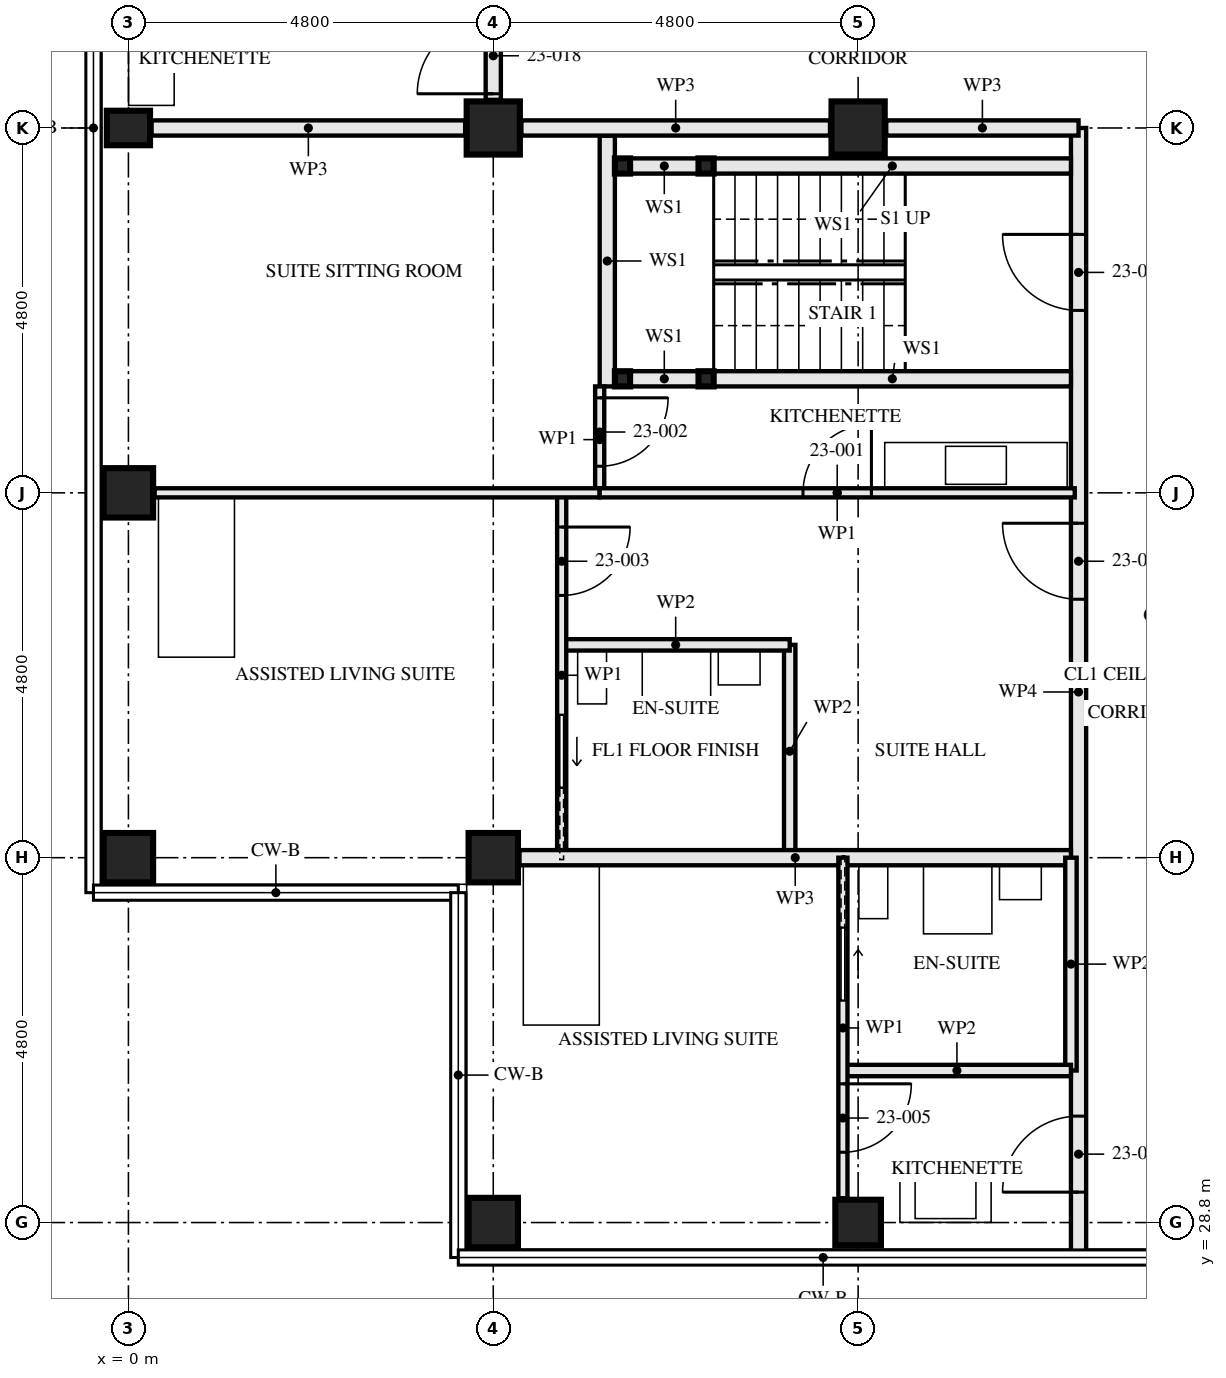
"""IFC4 building model, lengths in metres.
Left out: names, types, materials, properties, quantities, classifications, styles, units other than length and angle.
Written with IfcOpenShell. Run it as: python <this file> out.ifc"""

import sys

from ifc_helpers import new_model, si_unit, direction, frame, frame_2d, origin, origin_2d, place, context, subcontext, project, spatial, rectangle, hollow_rectangle, i_section, extrude, element, fill, save


model = new_model("IFC4")
c1 = context("Model", 3, precision=1e-05, world=origin(), true_north=direction((0.0, 1.0)))
c2 = subcontext(c1, "Body", "Model", "MODEL_VIEW")
j1 = project(units=[si_unit("LENGTHUNIT", "METRE"), si_unit("PLANEANGLEUNIT", "RADIAN")], contexts=[c1])
p1 = place(None, origin())
s1 = spatial("IfcSite", under=j1, at=p1, CompositionType="ELEMENT")
p2 = place(p1, origin())
s2 = spatial("IfcBuilding", under=s1, at=p2, CompositionType="ELEMENT")
p3 = place(p2, frame((0.0, 0.0, 87.5)))
s3 = spatial("IfcBuildingStorey", under=s2, at=p3, CompositionType="ELEMENT", Elevation=87.5)
for number, where, z_axis, x_axis in (
    (1, (0.0, 33.6, 0.0), (0.0, 0.0, 1.0), (0.0, 1.0, 0.0)),
    (2, (0.0, 38.4, 0.0), (0.0, 0.0, 1.0), (1.0, 0.0, 0.0)),
):
    element("IfcColumn", number, at=place(p3, frame(where, z_axis=z_axis, x_axis=x_axis)), inside=s3, PredefinedType="COLUMN", context=c2, shape_type="SweptSolid", body=[
        extrude(hollow_rectangle(XDim=0.65, YDim=0.65, WallThickness=0.08, at=origin_2d()), origin(), (0.0, 0.0, 1.0), 3.5),
    ])
p4 = place(p3, frame((0.0, 43.2, 0.0), z_axis=(0.0, 0.0, 1.0), x_axis=(0.0, 1.0, 0.0)))
e3 = element("IfcColumn", 3, at=p4, inside=s3, PredefinedType="COLUMN", context=c2, shape_type="SweptSolid", body=[
    extrude(i_section(OverallWidth=0.454, OverallDepth=0.569, WebThickness=0.078, FlangeThickness=0.125, FilletRadius=0.015, at=origin_2d()), origin(), (0.0, 0.0, 1.0), 3.5),
])
for number, where, z_axis, x_axis in (
    (4, (4.8, 28.8, 0.0), (0.0, 0.0, 1.0), (0.0, 1.0, 0.0)),
    (5, (4.8, 33.6, 0.0), (0.0, 0.0, 1.0), (0.0, 1.0, 0.0)),
):
    element("IfcColumn", number, at=place(p3, frame(where, z_axis=z_axis, x_axis=x_axis)), inside=s3, PredefinedType="COLUMN", context=c2, shape_type="SweptSolid", body=[
        extrude(hollow_rectangle(XDim=0.65, YDim=0.65, WallThickness=0.08, at=origin_2d()), origin(), (0.0, 0.0, 1.0), 3.5),
    ])
p5 = place(p3, frame((4.8, 43.2, 0.0), z_axis=(0.0, 0.0, 1.0), x_axis=(0.0, 1.0, 0.0)))
e6 = element("IfcColumn", 6, at=p5, inside=s3, PredefinedType="COLUMN", context=c2, shape_type="SweptSolid", body=[
    extrude(hollow_rectangle(XDim=0.7, YDim=0.7, WallThickness=0.06, at=origin_2d()), origin(), (0.0, 0.0, 1.0), 3.5),
])
p6 = place(p3, frame((9.6, 28.8, 0.0), z_axis=(0.0, 0.0, 1.0), x_axis=(0.0, 1.0, 0.0)))
e7 = element("IfcColumn", 7, at=p6, inside=s3, PredefinedType="COLUMN", context=c2, shape_type="SweptSolid", body=[
    extrude(hollow_rectangle(XDim=0.6, YDim=0.6, WallThickness=0.08, at=origin_2d()), origin(), (0.0, 0.0, 1.0), 3.5),
])
p7 = place(p3, frame((9.6, 43.2, 0.0), z_axis=(0.0, 0.0, 1.0), x_axis=(0.0, 1.0, 0.0)))
e8 = element("IfcColumn", 8, at=p7, inside=s3, PredefinedType="COLUMN", context=c2, shape_type="SweptSolid", body=[
    extrude(hollow_rectangle(XDim=0.7, YDim=0.7, WallThickness=0.06, at=origin_2d()), origin(), (0.0, 0.0, 1.0), 3.5),
])
for number, where, z_axis, x_axis in (
    (9, (6.5, 42.7, 0.0), (0.0, 0.0, 1.0), (1.0, 0.0, 0.0)),
    (10, (6.5, 39.9, 0.0), (0.0, 0.0, 1.0), (1.0, 0.0, 0.0)),
    (11, (7.6, 42.7, 0.0), (0.0, 0.0, 1.0), (1.0, 0.0, 0.0)),
    (12, (7.6, 39.9, 0.0), (0.0, 0.0, 1.0), (1.0, 0.0, 0.0)),
):
    element("IfcColumn", number, at=place(p3, frame(where, z_axis=z_axis, x_axis=x_axis)), inside=s3, PredefinedType="COLUMN", context=c2, shape_type="SweptSolid", body=[
        extrude(hollow_rectangle(XDim=0.2, YDim=0.2, WallThickness=0.008, at=origin_2d()), origin(), (0.0, 0.0, 1.0), 3.33),
    ])
p8 = place(p3, frame((6.6, 42.7, 0.0), z_axis=(0.0, 0.0, 1.0), x_axis=(1.0, 0.0, 0.0)))
e13 = element("IfcWall", 13, at=p8, inside=s3, PredefinedType="SOLIDWALL", context=c2, shape_type="SweptSolid", body=[
    extrude(rectangle(XDim=0.9, YDim=0.2, at=frame_2d((0.45, 0.0))), origin(), (0.0, 0.0, 1.0), 2.99),
])
p9 = place(p3, frame((7.7, 42.7, 0.0), z_axis=(0.0, 0.0, 1.0), x_axis=(1.0, 0.0, 0.0)))
e14 = element("IfcWall", 14, at=p9, inside=s3, PredefinedType="SOLIDWALL", context=c2, shape_type="SweptSolid", body=[
    extrude(rectangle(XDim=4.7, YDim=0.2, at=frame_2d((2.35, 0.0))), origin(), (0.0, 0.0, 1.0), 2.99),
])
p10 = place(p3, frame((6.6, 39.9, 0.0), z_axis=(0.0, 0.0, 1.0), x_axis=(1.0, 0.0, 0.0)))
e15 = element("IfcWall", 15, at=p10, inside=s3, PredefinedType="SOLIDWALL", context=c2, shape_type="SweptSolid", body=[
    extrude(rectangle(XDim=0.9, YDim=0.2, at=frame_2d((0.45, 0.0))), origin(), (0.0, 0.0, 1.0), 2.99),
])
p11 = place(p3, frame((7.7, 39.9, 0.0), z_axis=(0.0, 0.0, 1.0), x_axis=(1.0, 0.0, 0.0)))
e16 = element("IfcWall", 16, at=p11, inside=s3, PredefinedType="SOLIDWALL", context=c2, shape_type="SweptSolid", body=[
    extrude(rectangle(XDim=4.7, YDim=0.2, at=frame_2d((2.35, 0.0))), origin(), (0.0, 0.0, 1.0), 2.99),
])
p12 = place(p3, frame((6.3, 43.1, 0.0), z_axis=(0.0, 0.0, 1.0), x_axis=(0.0, -1.0, 0.0)))
e17 = element("IfcWall", 17, at=p12, inside=s3, PredefinedType="SOLIDWALL", context=c2, shape_type="SweptSolid", body=[
    extrude(rectangle(XDim=3.3, YDim=0.2, at=frame_2d((1.65, 0.0))), origin(), (0.0, 0.0, 1.0), 3.33),
])
p13 = place(p3, frame((5.7, 36.4, 0.0), z_axis=(0.0, 0.0, 1.0), x_axis=(1.0, 0.0, 0.0)))
e18 = element("IfcWall", 18, at=p13, inside=s3, PredefinedType="PARTITIONING", context=c2, shape_type="SweptSolid", body=[
    extrude(rectangle(XDim=3.0, YDim=0.15, at=frame_2d((1.5, 0.0))), origin(), (0.0, 0.0, 1.0), 3.33),
])
p14 = place(p3, frame((8.7, 36.4, 0.0), z_axis=(0.0, 0.0, 1.0), x_axis=(0.0, -1.0, 0.0)))
e19 = element("IfcWall", 19, at=p14, inside=s3, PredefinedType="PARTITIONING", context=c2, shape_type="SweptSolid", body=[
    extrude(rectangle(XDim=2.8, YDim=0.15, at=frame_2d((1.4, 0.0))), origin(), (0.0, 0.0, 1.0), 3.33),
])
p15 = place(p3, frame((6.2, 38.4, 0.0), z_axis=(0.0, 0.0, 1.0), x_axis=(1.0, 0.0, 0.0)))
e20 = element("IfcWall", 20, at=p15, inside=s3, PredefinedType="PARTITIONING", context=c2, shape_type="SweptSolid", body=[
    extrude(rectangle(XDim=6.25, YDim=0.12, at=frame_2d((3.125, 0.0))), origin(), (0.0, 0.0, 1.0), 2.55),
])
p16 = place(p15, frame((2.675, 0.0, 0.0)))
e21 = element("IfcOpeningElement", 21, at=p16, cuts=e20, PredefinedType="OPENING", context=c2, shape_type="SweptSolid", body=[
    extrude(rectangle(XDim=0.9, YDim=2.1, at=frame_2d((0.45, 1.05))), frame((0.0, 0.071, 0.0), z_axis=(0.0, -1.0, 0.0), x_axis=(1.0, 0.0, 0.0)), (0.0, 0.0, 1.0), 0.141),
])
p17 = place(p3, frame((6.2, 39.8, 0.0), z_axis=(0.0, 0.0, 1.0), x_axis=(0.0, -1.0, 0.0)))
e22 = element("IfcWall", 22, at=p17, inside=s3, PredefinedType="PARTITIONING", context=c2, shape_type="SweptSolid", body=[
    extrude(rectangle(XDim=1.4, YDim=0.12, at=frame_2d((0.7, 0.0))), origin(), (0.0, 0.0, 1.0), 3.33),
])
p18 = place(p17, frame((0.15, 0.0, 0.0)))
e23 = element("IfcOpeningElement", 23, at=p18, cuts=e22, PredefinedType="OPENING", context=c2, shape_type="SweptSolid", body=[
    extrude(rectangle(XDim=0.9, YDim=2.1, at=frame_2d((0.45, 1.05))), frame((0.0, 0.071, 0.0), z_axis=(0.0, -1.0, 0.0), x_axis=(1.0, 0.0, 0.0)), (0.0, 0.0, 1.0), 0.141),
])
p19 = place(p3, frame((5.7, 38.4, 0.0), z_axis=(0.0, 0.0, 1.0), x_axis=(0.0, -1.0, 0.0)))
e24 = element("IfcWall", 24, at=p19, inside=s3, PredefinedType="PARTITIONING", context=c2, shape_type="SweptSolid", body=[
    extrude(rectangle(XDim=4.8, YDim=0.12, at=frame_2d((2.4, 0.0))), origin(), (0.0, 0.0, 1.0), 3.33),
])
p20 = place(p19, frame((0.45, 0.0, 0.0)))
e25 = element("IfcOpeningElement", 25, at=p20, cuts=e24, PredefinedType="OPENING", context=c2, shape_type="SweptSolid", body=[
    extrude(rectangle(XDim=0.9, YDim=2.1, at=frame_2d((0.45, 1.05))), frame((0.0, 0.071, 0.0), z_axis=(0.0, -1.0, 0.0), x_axis=(1.0, 0.0, 0.0)), (0.0, 0.0, 1.0), 0.141),
])
p21 = place(p19, frame((2.925, 0.0, 0.0)))
e26 = element("IfcOpeningElement", 26, at=p21, cuts=e24, PredefinedType="OPENING", context=c2, shape_type="SweptSolid", body=[
    extrude(rectangle(XDim=0.95, YDim=2.1, at=frame_2d((0.475, 1.05))), frame((0.0, 0.071, 0.0), z_axis=(0.0, -1.0, 0.0), x_axis=(1.0, 0.0, 0.0)), (0.0, 0.0, 1.0), 0.141),
])
p22 = place(p3, frame((0.345, 38.4, 0.0), z_axis=(0.0, 0.0, 1.0), x_axis=(1.0, 0.0, 0.0)))
e27 = element("IfcWall", 27, at=p22, inside=s3, PredefinedType="PARTITIONING", context=c2, shape_type="SweptSolid", body=[
    extrude(rectangle(XDim=5.855, YDim=0.12, at=frame_2d((2.927, 0.0))), origin(), (0.0, 0.0, 1.0), 2.55),
])
p23 = place(p3, frame((5.145, 33.6, 0.0), z_axis=(0.0, 0.0, 1.0), x_axis=(1.0, 0.0, 0.0)))
e28 = element("IfcWall", 28, at=p23, inside=s3, PredefinedType="PARTITIONING", context=c2, shape_type="SweptSolid", body=[
    extrude(rectangle(XDim=7.255, YDim=0.2, at=frame_2d((3.627, 0.0))), origin(), (0.0, 0.0, 1.0), 2.55),
])
p24 = place(p3, frame((9.4, 30.8, 0.0), z_axis=(0.0, 0.0, 1.0), x_axis=(1.0, 0.0, 0.0)))
e29 = element("IfcWall", 29, at=p24, inside=s3, PredefinedType="PARTITIONING", context=c2, shape_type="SweptSolid", body=[
    extrude(rectangle(XDim=3.0, YDim=0.15, at=frame_2d((1.5, 0.0))), origin(), (0.0, 0.0, 1.0), 3.33),
])
p25 = place(p3, frame((12.4, 33.6, 0.0), z_axis=(0.0, 0.0, 1.0), x_axis=(0.0, -1.0, 0.0)))
e30 = element("IfcWall", 30, at=p25, inside=s3, PredefinedType="PARTITIONING", context=c2, shape_type="SweptSolid", body=[
    extrude(rectangle(XDim=2.8, YDim=0.15, at=frame_2d((1.4, 0.0))), origin(), (0.0, 0.0, 1.0), 3.33),
])
p26 = place(p3, frame((9.4, 33.6, 0.0), z_axis=(0.0, 0.0, 1.0), x_axis=(0.0, -1.0, 0.0)))
e31 = element("IfcWall", 31, at=p26, inside=s3, PredefinedType="PARTITIONING", context=c2, shape_type="SweptSolid", body=[
    extrude(rectangle(XDim=4.48, YDim=0.12, at=frame_2d((2.24, 0.0))), origin(), (0.0, 0.0, 1.0), 3.33),
])
p27 = place(p26, frame((2.975, 0.0, 0.0)))
e32 = element("IfcOpeningElement", 32, at=p27, cuts=e31, PredefinedType="OPENING", context=c2, shape_type="SweptSolid", body=[
    extrude(rectangle(XDim=0.9, YDim=2.1, at=frame_2d((0.45, 1.05))), frame((0.0, 0.071, 0.0), z_axis=(0.0, -1.0, 0.0), x_axis=(1.0, 0.0, 0.0)), (0.0, 0.0, 1.0), 0.141),
])
p28 = place(p26, frame((0.925, 0.0, 0.0)))
e33 = element("IfcOpeningElement", 33, at=p28, cuts=e31, PredefinedType="OPENING", context=c2, shape_type="SweptSolid", body=[
    extrude(rectangle(XDim=0.95, YDim=2.1, at=frame_2d((0.475, 1.05))), frame((0.0, 0.071, 0.0), z_axis=(0.0, -1.0, 0.0), x_axis=(1.0, 0.0, 0.0)), (0.0, 0.0, 1.0), 0.141),
])
p29 = place(p3, frame((12.5, 43.2, 0.0), z_axis=(0.0, 0.0, 1.0), x_axis=(0.0, -1.0, 0.0)))
e34 = element("IfcWall", 34, at=p29, inside=s3, PredefinedType="PARTITIONING", context=c2, shape_type="SweptSolid", body=[
    extrude(rectangle(XDim=14.84, YDim=0.2, at=frame_2d((7.42, 0.0))), origin(), (0.0, 0.0, 1.0), 2.32),
])
p30 = place(p29, frame((1.4, 0.0, 0.0)))
e35 = element("IfcOpeningElement", 35, at=p30, cuts=e34, PredefinedType="OPENING", context=c2, shape_type="SweptSolid", body=[
    extrude(rectangle(XDim=1.0, YDim=2.1, at=frame_2d((0.5, 1.05))), frame((0.0, 0.111, 0.0), z_axis=(0.0, -1.0, 0.0), x_axis=(1.0, 0.0, 0.0)), (0.0, 0.0, 1.0), 0.221),
])
p31 = place(p29, frame((5.2, 0.0, 0.0)))
e36 = element("IfcOpeningElement", 36, at=p31, cuts=e34, PredefinedType="OPENING", context=c2, shape_type="SweptSolid", body=[
    extrude(rectangle(XDim=1.0, YDim=2.1, at=frame_2d((0.5, 1.05))), frame((0.0, 0.111, 0.0), z_axis=(0.0, -1.0, 0.0), x_axis=(1.0, 0.0, 0.0)), (0.0, 0.0, 1.0), 0.221),
])
p32 = place(p29, frame((13.0, 0.0, 0.0)))
e37 = element("IfcOpeningElement", 37, at=p32, cuts=e34, PredefinedType="OPENING", context=c2, shape_type="SweptSolid", body=[
    extrude(rectangle(XDim=1.0, YDim=2.1, at=frame_2d((0.5, 1.05))), frame((0.0, 0.111, 0.0), z_axis=(0.0, -1.0, 0.0), x_axis=(1.0, 0.0, 0.0)), (0.0, 0.0, 1.0), 0.221),
])
p33 = place(p3, frame((4.8, 45.2, 0.0), z_axis=(0.0, 0.0, 1.0), x_axis=(0.0, -1.0, 0.0)))
e38 = element("IfcWall", 38, at=p33, inside=s3, PredefinedType="PARTITIONING", context=c2, shape_type="SweptSolid", body=[
    extrude(rectangle(XDim=1.63, YDim=0.2, at=frame_2d((0.815, 0.0))), origin(), (0.0, 0.0, 1.0), 3.33),
])
p34 = place(p33, frame((0.55, 0.0, 0.0)))
e39 = element("IfcOpeningElement", 39, at=p34, cuts=e38, PredefinedType="OPENING", context=c2, shape_type="SweptSolid", body=[
    extrude(rectangle(XDim=1.0, YDim=2.1, at=frame_2d((0.5, 1.05))), frame((0.0, 0.111, 0.0), z_axis=(0.0, -1.0, 0.0), x_axis=(1.0, 0.0, 0.0)), (0.0, 0.0, 1.0), 0.221),
])
p35 = place(p3, frame((12.5, 43.2, 0.0), z_axis=(0.0, 0.0, 1.0), x_axis=(-1.0, 0.0, 0.0)))
e40 = element("IfcWall", 40, at=p35, inside=s3, PredefinedType="PARTITIONING", context=c2, shape_type="SweptSolid", body=[
    extrude(rectangle(XDim=2.53, YDim=0.2, at=frame_2d((1.265, 0.0))), origin(), (0.0, 0.0, 1.0), 2.32),
])
p36 = place(p3, frame((9.23, 43.2, 0.0), z_axis=(0.0, 0.0, 1.0), x_axis=(-1.0, 0.0, 0.0)))
e41 = element("IfcWall", 41, at=p36, inside=s3, PredefinedType="PARTITIONING", context=c2, shape_type="SweptSolid", body=[
    extrude(rectangle(XDim=4.06, YDim=0.2, at=frame_2d((2.03, 0.0))), origin(), (0.0, 0.0, 1.0), 2.32),
])
p37 = place(p3, frame((4.43, 43.2, 0.0), z_axis=(0.0, 0.0, 1.0), x_axis=(-1.0, 0.0, 0.0)))
e42 = element("IfcWall", 42, at=p37, inside=s3, PredefinedType="PARTITIONING", context=c2, shape_type="SweptSolid", body=[
    extrude(rectangle(XDim=4.125, YDim=0.2, at=frame_2d((2.063, 0.0))), origin(), (0.0, 0.0, 1.0), 2.32),
])
p38 = place(p16, origin())
e43 = element("IfcDoor", 43, at=p38, inside=s3, OperationType="SINGLE_SWING_LEFT", PredefinedType="DOOR", context=c2, shape_type="SweptSolid", body=[
    extrude(rectangle(XDim=0.9, YDim=2.1, at=frame_2d((0.45, 1.05))), frame((0.0, 0.022, 0.0), z_axis=(0.0, -1.0, 0.0), x_axis=(1.0, 0.0, 0.0)), (0.0, 0.0, 1.0), 0.044),
])
fill(e21, e43)
p39 = place(p18, origin())
e44 = element("IfcDoor", 44, at=p39, inside=s3, OperationType="SINGLE_SWING_RIGHT", PredefinedType="DOOR", context=c2, shape_type="SweptSolid", body=[
    extrude(rectangle(XDim=0.9, YDim=2.1, at=frame_2d((0.45, 1.05))), frame((0.0, 0.022, 0.0), z_axis=(0.0, -1.0, 0.0), x_axis=(1.0, 0.0, 0.0)), (0.0, 0.0, 1.0), 0.044),
])
fill(e23, e44)
p40 = place(p20, origin())
e45 = element("IfcDoor", 45, at=p40, inside=s3, OperationType="SINGLE_SWING_RIGHT", PredefinedType="DOOR", context=c2, shape_type="SweptSolid", body=[
    extrude(rectangle(XDim=0.9, YDim=2.1, at=frame_2d((0.45, 1.05))), frame((0.0, 0.022, 0.0), z_axis=(0.0, -1.0, 0.0), x_axis=(1.0, 0.0, 0.0)), (0.0, 0.0, 1.0), 0.044),
])
fill(e25, e45)
p41 = place(p21, origin())
e46 = element("IfcDoor", 46, at=p41, inside=s3, OperationType="SLIDING_TO_LEFT", PredefinedType="DOOR", context=c2, shape_type="SweptSolid", body=[
    extrude(rectangle(XDim=0.95, YDim=2.1, at=frame_2d((0.475, 1.05))), frame((0.0, 0.022, 0.0), z_axis=(0.0, -1.0, 0.0), x_axis=(1.0, 0.0, 0.0)), (0.0, 0.0, 1.0), 0.044),
])
fill(e26, e46)
p42 = place(p27, origin())
e47 = element("IfcDoor", 47, at=p42, inside=s3, OperationType="SINGLE_SWING_RIGHT", PredefinedType="DOOR", context=c2, shape_type="SweptSolid", body=[
    extrude(rectangle(XDim=0.9, YDim=2.1, at=frame_2d((0.45, 1.05))), frame((0.0, 0.022, 0.0), z_axis=(0.0, -1.0, 0.0), x_axis=(1.0, 0.0, 0.0)), (0.0, 0.0, 1.0), 0.044),
])
fill(e32, e47)
p43 = place(p28, origin())
e48 = element("IfcDoor", 48, at=p43, inside=s3, OperationType="SLIDING_TO_RIGHT", PredefinedType="DOOR", context=c2, shape_type="SweptSolid", body=[
    extrude(rectangle(XDim=0.95, YDim=2.1, at=frame_2d((0.475, 1.05))), frame((0.0, 0.022, 0.0), z_axis=(0.0, -1.0, 0.0), x_axis=(1.0, 0.0, 0.0)), (0.0, 0.0, 1.0), 0.044),
])
fill(e33, e48)
p44 = place(p30, frame((1.0, 0.0, 0.0), z_axis=(0.0, 0.0, 1.0), x_axis=(-1.0, 0.0, 0.0)))
e49 = element("IfcDoor", 49, at=p44, inside=s3, OperationType="SINGLE_SWING_LEFT", PredefinedType="DOOR", context=c2, shape_type="SweptSolid", body=[
    extrude(rectangle(XDim=1.0, YDim=2.1, at=frame_2d((0.5, 1.05))), frame((0.0, 0.032, 0.0), z_axis=(0.0, -1.0, 0.0), x_axis=(1.0, 0.0, 0.0)), (0.0, 0.0, 1.0), 0.064),
])
fill(e35, e49)
p45 = place(p31, frame((1.0, 0.0, 0.0), z_axis=(0.0, 0.0, 1.0), x_axis=(-1.0, 0.0, 0.0)))
e50 = element("IfcDoor", 50, at=p45, inside=s3, OperationType="SINGLE_SWING_LEFT", PredefinedType="DOOR", context=c2, shape_type="SweptSolid", body=[
    extrude(rectangle(XDim=1.0, YDim=2.1, at=frame_2d((0.5, 1.05))), frame((0.0, 0.027, 0.0), z_axis=(0.0, -1.0, 0.0), x_axis=(1.0, 0.0, 0.0)), (0.0, 0.0, 1.0), 0.054),
])
fill(e36, e50)
p46 = place(p32, frame((1.0, 0.0, 0.0), z_axis=(0.0, 0.0, 1.0), x_axis=(-1.0, 0.0, 0.0)))
e51 = element("IfcDoor", 51, at=p46, inside=s3, OperationType="SINGLE_SWING_RIGHT", PredefinedType="DOOR", context=c2, shape_type="SweptSolid", body=[
    extrude(rectangle(XDim=1.0, YDim=2.1, at=frame_2d((0.5, 1.05))), frame((0.0, 0.027, 0.0), z_axis=(0.0, -1.0, 0.0), x_axis=(1.0, 0.0, 0.0)), (0.0, 0.0, 1.0), 0.054),
])
fill(e37, e51)
p47 = place(p34, frame((1.0, 0.0, 0.0), z_axis=(0.0, 0.0, 1.0), x_axis=(-1.0, 0.0, 0.0)))
e52 = element("IfcDoor", 52, at=p47, inside=s3, OperationType="SINGLE_SWING_RIGHT", PredefinedType="DOOR", context=c2, shape_type="SweptSolid", body=[
    extrude(rectangle(XDim=1.0, YDim=2.1, at=frame_2d((0.5, 1.05))), frame((0.0, 0.027, 0.0), z_axis=(0.0, -1.0, 0.0), x_axis=(1.0, 0.0, 0.0)), (0.0, 0.0, 1.0), 0.054),
])
fill(e39, e52)
save(model, sys.argv[1])
